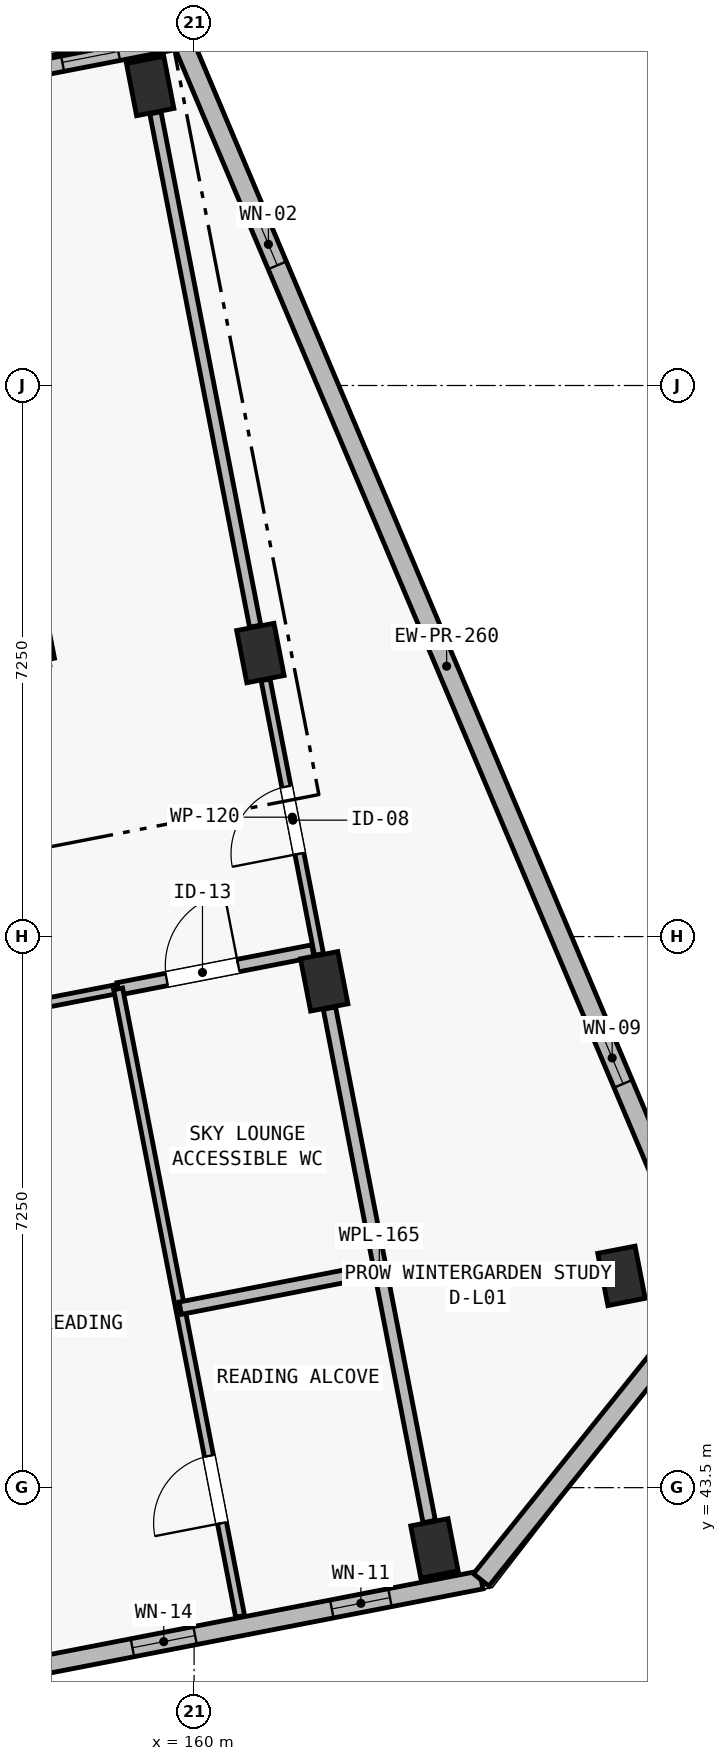
"""IFC4 building model, lengths in metres.
Left out: names, types, materials, properties, quantities, classifications, styles, units other than length and angle.
Written with IfcOpenShell. Run it as: python <this file> out.ifc"""

import sys

from ifc_helpers import new_model, si_unit, direction, frame, frame_2d, origin, origin_2d, place, context, subcontext, project, spatial, rectangle, extrude, element, fill, save


model = new_model("IFC4")
c1 = context("Model", 3, precision=1e-05, world=origin(), true_north=direction((0.0, 1.0)))
c2 = subcontext(c1, "Body", "Model", "MODEL_VIEW")
j1 = project(units=[si_unit("LENGTHUNIT", "METRE"), si_unit("PLANEANGLEUNIT", "RADIAN")], contexts=[c1])
p1 = place(None, origin())
s1 = spatial("IfcSite", under=j1, at=p1, CompositionType="ELEMENT")
p2 = place(p1, origin())
s2 = spatial("IfcBuilding", under=s1, at=p2, CompositionType="ELEMENT")
p3 = place(p2, frame((0.0, 0.0, 4.5)))
s3 = spatial("IfcBuildingStorey", under=s2, at=p3, CompositionType="ELEMENT", Elevation=4.5)
for number, where, z_axis, x_axis in (
    (1, (163.162, 42.701, 0.0), (0.0, 0.0, 1.0), (0.982, 0.191, 0.0)),
    (2, (161.712, 50.161, 0.0), (0.0, 0.0, 1.0), (0.982, 0.191, 0.0)),
    (3, (160.873, 54.48, 0.0), (0.0, 0.0, 1.0), (0.982, 0.191, 0.0)),
    (4, (159.422, 61.941, 0.0), (0.0, 0.0, 1.0), (0.982, 0.191, 0.0)),
    (5, (165.623, 46.286, 0.0), (0.0, 0.0, 1.0), (0.982, 0.191, 0.0)),
):
    element("IfcColumn", number, at=place(p3, frame(where, z_axis=z_axis, x_axis=x_axis)), inside=s3, PredefinedType="COLUMN", context=c2, shape_type="SweptSolid", body=[
        extrude(rectangle(XDim=0.5, YDim=0.7, at=origin_2d()), origin(), (0.0, 0.0, 1.0), 3.9),
    ])
p4 = place(p3, frame((163.778, 42.286, 0.0), z_axis=(0.0, 0.0, 1.0), x_axis=(-0.981628367112, -0.190802905848, 0.0)))
e6 = element("IfcWall", 6, at=p4, inside=s3, PredefinedType="SOLIDWALL", context=c2, shape_type="SweptSolid", body=[
    extrude(rectangle(XDim=8.125, YDim=0.24, at=frame_2d((4.062, 0.0))), origin(), (0.0, 0.0, 1.0), 3.65),
])
p5 = place(p4, frame((1.223, 0.0, 0.42)))
e7 = element("IfcOpeningElement", 7, at=p5, cuts=e6, PredefinedType="OPENING", context=c2, shape_type="SweptSolid", body=[
    extrude(rectangle(XDim=0.78, YDim=2.2, at=frame_2d((0.39, 1.1))), frame((0.0, 0.135, 0.0), z_axis=(0.0, -1.0, 0.0), x_axis=(1.0, 0.0, 0.0)), (0.0, 0.0, 1.0), 0.27),
])
p6 = place(p4, frame((3.835, 0.0, 0.42)))
e8 = element("IfcOpeningElement", 8, at=p6, cuts=e6, PredefinedType="OPENING", context=c2, shape_type="SweptSolid", body=[
    extrude(rectangle(XDim=0.84, YDim=2.28, at=frame_2d((0.42, 1.14))), frame((0.0, 0.135, 0.0), z_axis=(0.0, -1.0, 0.0), x_axis=(1.0, 0.0, 0.0)), (0.0, 0.0, 1.0), 0.27),
])
p7 = place(p4, frame((6.655, 0.0, 0.48)))
e9 = element("IfcOpeningElement", 9, at=p7, cuts=e6, PredefinedType="OPENING", context=c2, shape_type="SweptSolid", body=[
    extrude(rectangle(XDim=0.86, YDim=2.36, at=frame_2d((0.43, 1.18))), frame((0.0, 0.135, 0.0), z_axis=(0.0, -1.0, 0.0), x_axis=(1.0, 0.0, 0.0)), (0.0, 0.0, 1.0), 0.27),
])
p8 = place(p3, frame((151.862, 61.006, 0.0), z_axis=(0.0, 0.0, 1.0), x_axis=(0.981627273155, 0.190808533872, 0.0)))
e10 = element("IfcWall", 10, at=p8, inside=s3, PredefinedType="SOLIDWALL", context=c2, shape_type="SweptSolid", body=[
    extrude(rectangle(XDim=8.125, YDim=0.24, at=frame_2d((4.062, 0.0))), origin(), (0.0, 0.0, 1.0), 3.65),
])
p9 = place(p8, frame((6.525, 0.0, 0.45)))
e11 = element("IfcOpeningElement", 11, at=p9, cuts=e10, PredefinedType="OPENING", context=c2, shape_type="SweptSolid", body=[
    extrude(rectangle(XDim=0.75, YDim=2.32, at=frame_2d((0.375, 1.16))), frame((0.0, 0.135, 0.0), z_axis=(0.0, -1.0, 0.0), x_axis=(1.0, 0.0, 0.0)), (0.0, 0.0, 1.0), 0.27),
])
p10 = place(p3, frame((159.837, 62.556, 0.0), z_axis=(0.0, 0.0, 1.0), x_axis=(0.389225507936, -0.921142499276, 0.0)))
e12 = element("IfcWall", 12, at=p10, inside=s3, PredefinedType="SOLIDWALL", context=c2, shape_type="SweptSolid", body=[
    extrude(rectangle(XDim=17.91, YDim=0.26, at=frame_2d((8.955, 0.0))), origin(), (0.0, 0.0, 1.0), 3.65),
])
p11 = place(p10, frame((2.63, 0.0, 0.52)))
e13 = element("IfcOpeningElement", 13, at=p11, cuts=e12, PredefinedType="OPENING", context=c2, shape_type="SweptSolid", body=[
    extrude(rectangle(XDim=0.6, YDim=2.22, at=frame_2d((0.3, 1.11))), frame((0.0, 0.145, 0.0), z_axis=(0.0, -1.0, 0.0), x_axis=(1.0, 0.0, 0.0)), (0.0, 0.0, 1.0), 0.29),
])
p12 = place(p10, frame((14.18, 0.0, 0.45)))
e14 = element("IfcOpeningElement", 14, at=p12, cuts=e12, PredefinedType="OPENING", context=c2, shape_type="SweptSolid", body=[
    extrude(rectangle(XDim=0.74, YDim=2.26, at=frame_2d((0.37, 1.13))), frame((0.0, 0.145, 0.0), z_axis=(0.0, -1.0, 0.0), x_axis=(1.0, 0.0, 0.0)), (0.0, 0.0, 1.0), 0.29),
])
p13 = place(p3, frame((166.809, 46.058, 0.0), z_axis=(0.0, 0.0, 1.0), x_axis=(-0.626281072923, -0.779597343312, 0.0)))
e15 = element("IfcWall", 15, at=p13, inside=s3, PredefinedType="SOLIDWALL", context=c2, shape_type="SweptSolid", body=[
    extrude(rectangle(XDim=4.839, YDim=0.26, at=frame_2d((2.42, 0.0))), origin(), (0.0, 0.0, 1.0), 3.65),
])
p14 = place(p3, frame((158.087, 54.397, 0.0), z_axis=(0.0, 0.0, 1.0), x_axis=(-0.190796144009, 0.981629681413, 0.0)))
e16 = element("IfcWall", 16, at=p14, inside=s3, PredefinedType="PARTITIONING", context=c2, shape_type="SweptSolid", body=[
    extrude(rectangle(XDim=4.0, YDim=0.155, at=frame_2d((2.0, 0.0))), origin(), (0.0, 0.0, 1.0), 3.62),
])
p15 = place(p14, frame((1.4, 0.0, 0.0)))
e17 = element("IfcOpeningElement", 17, at=p15, cuts=e16, PredefinedType="OPENING", context=c2, shape_type="SweptSolid", body=[
    extrude(rectangle(XDim=1.18, YDim=2.15, at=frame_2d((0.59, 1.075))), frame((0.0, 0.093, 0.0), z_axis=(0.0, -1.0, 0.0), x_axis=(1.0, 0.0, 0.0)), (0.0, 0.0, 1.0), 0.185),
])
p16 = place(p3, frame((161.643, 50.515, 0.0), z_axis=(0.0, 0.0, 1.0), x_axis=(-0.190805731561, 0.981627817864, 0.0)))
e18 = element("IfcWall", 18, at=p16, inside=s3, PredefinedType="PARTITIONING", context=c2, shape_type="SweptSolid", body=[
    extrude(rectangle(XDim=3.68, YDim=0.12, at=frame_2d((1.84, 0.0))), origin(), (0.0, 0.0, 1.0), 3.15),
])
p17 = place(p16, frame((1.35, 0.0, 0.0)))
e19 = element("IfcOpeningElement", 19, at=p17, cuts=e18, PredefinedType="OPENING", context=c2, shape_type="SweptSolid", body=[
    extrude(rectangle(XDim=0.9, YDim=2.1, at=frame_2d((0.45, 1.05))), frame((0.0, 0.075, 0.0), z_axis=(0.0, -1.0, 0.0), x_axis=(1.0, 0.0, 0.0)), (0.0, 0.0, 1.0), 0.15),
])
p18 = place(p3, frame((160.804, 54.834, 0.0), z_axis=(0.0, 0.0, 1.0), x_axis=(-0.190804123115, 0.981628130507, 0.0)))
e20 = element("IfcWall", 20, at=p18, inside=s3, PredefinedType="PARTITIONING", context=c2, shape_type="SweptSolid", body=[
    extrude(rectangle(XDim=6.88, YDim=0.15, at=frame_2d((3.44, 0.0))), origin(), (0.0, 0.0, 1.0), 3.15),
])
p19 = place(p3, frame((163.094, 43.054, 0.0), z_axis=(0.0, 0.0, 1.0), x_axis=(-0.190804123115, 0.981628130507, 0.0)))
e21 = element("IfcWall", 21, at=p19, inside=s3, PredefinedType="PLUMBINGWALL", context=c2, shape_type="SweptSolid", body=[
    extrude(rectangle(XDim=6.88, YDim=0.165, at=frame_2d((3.44, 0.0))), origin(), (0.0, 0.0, 1.0), 3.15),
])
p20 = place(p3, frame((154.427, 49.173, 0.0), z_axis=(0.0, 0.0, 1.0), x_axis=(0.981628202514, 0.190803752658, 0.0)))
e22 = element("IfcWall", 22, at=p20, inside=s3, PredefinedType="PARTITIONING", context=c2, shape_type="SweptSolid", body=[
    extrude(rectangle(XDim=4.66, YDim=0.12, at=frame_2d((2.33, 0.0))), origin(), (0.0, 0.0, 1.0), 3.62),
])
p21 = place(p20, frame((1.15, 0.0, 0.0)))
e23 = element("IfcOpeningElement", 23, at=p21, cuts=e22, PredefinedType="OPENING", context=c2, shape_type="SweptSolid", body=[
    extrude(rectangle(XDim=1.15, YDim=2.15, at=frame_2d((0.575, 1.075))), frame((0.0, 0.075, 0.0), z_axis=(0.0, -1.0, 0.0), x_axis=(1.0, 0.0, 0.0)), (0.0, 0.0, 1.0), 0.15),
])
p22 = place(p3, frame((159.001, 50.062, 0.0), z_axis=(0.0, 0.0, 1.0), x_axis=(0.981624151626, 0.190824592083, 0.0)))
e24 = element("IfcWall", 24, at=p22, inside=s3, PredefinedType="PLUMBINGWALL", context=c2, shape_type="SweptSolid", body=[
    extrude(rectangle(XDim=2.61, YDim=0.165, at=frame_2d((1.305, 0.0))), origin(), (0.0, 0.0, 1.0), 3.62),
])
p23 = place(p22, frame((0.65, 0.0, 0.0)))
e25 = element("IfcOpeningElement", 25, at=p23, cuts=e24, PredefinedType="OPENING", context=c2, shape_type="SweptSolid", body=[
    extrude(rectangle(XDim=0.96, YDim=2.12, at=frame_2d((0.48, 1.06))), frame((0.0, 0.097, 0.0), z_axis=(0.0, -1.0, 0.0), x_axis=(1.0, 0.0, 0.0)), (0.0, 0.0, 1.0), 0.195),
])
p24 = place(p3, frame((160.606, 41.807, 0.0), z_axis=(0.0, 0.0, 1.0), x_axis=(-0.190809830256, 0.981627021163, 0.0)))
e26 = element("IfcWall", 26, at=p24, inside=s3, PredefinedType="PARTITIONING", context=c2, shape_type="SweptSolid", body=[
    extrude(rectangle(XDim=8.41, YDim=0.12, at=frame_2d((4.205, 0.0))), origin(), (0.0, 0.0, 1.0), 3.62),
])
p25 = place(p24, frame((1.25, 0.0, 0.0)))
e27 = element("IfcOpeningElement", 27, at=p25, cuts=e26, PredefinedType="OPENING", context=c2, shape_type="SweptSolid", body=[
    extrude(rectangle(XDim=0.9, YDim=2.1, at=frame_2d((0.45, 1.05))), frame((0.0, 0.075, 0.0), z_axis=(0.0, -1.0, 0.0), x_axis=(1.0, 0.0, 0.0)), (0.0, 0.0, 1.0), 0.15),
])
p26 = place(p3, frame((159.818, 45.861, 0.0), z_axis=(0.0, 0.0, 1.0), x_axis=(0.981628634101, 0.19080153226, 0.0)))
e28 = element("IfcWall", 28, at=p26, inside=s3, PredefinedType="PLUMBINGWALL", context=c2, shape_type="SweptSolid", body=[
    extrude(rectangle(XDim=2.59, YDim=0.165, at=frame_2d((1.295, 0.0))), origin(), (0.0, 0.0, 1.0), 3.62),
])
p27 = place(p5, origin())
e29 = element("IfcWindow", 29, at=p27, inside=s3, PartitioningType="SINGLE_PANEL", PredefinedType="WINDOW", context=c2, shape_type="SweptSolid", body=[
    extrude(rectangle(XDim=0.78, YDim=2.2, at=frame_2d((0.39, 1.1))), frame((0.0, 0.03, 0.0), z_axis=(0.0, -1.0, 0.0), x_axis=(1.0, 0.0, 0.0)), (0.0, 0.0, 1.0), 0.06),
])
fill(e7, e29)
p28 = place(p6, origin())
e30 = element("IfcWindow", 30, at=p28, inside=s3, PartitioningType="SINGLE_PANEL", PredefinedType="WINDOW", context=c2, shape_type="SweptSolid", body=[
    extrude(rectangle(XDim=0.84, YDim=2.28, at=frame_2d((0.42, 1.14))), frame((0.0, 0.03, 0.0), z_axis=(0.0, -1.0, 0.0), x_axis=(1.0, 0.0, 0.0)), (0.0, 0.0, 1.0), 0.06),
])
fill(e8, e30)
p29 = place(p9, origin())
e31 = element("IfcWindow", 31, at=p29, inside=s3, PartitioningType="SINGLE_PANEL", PredefinedType="WINDOW", context=c2, shape_type="SweptSolid", body=[
    extrude(rectangle(XDim=0.75, YDim=2.32, at=frame_2d((0.375, 1.16))), frame((0.0, 0.03, 0.0), z_axis=(0.0, -1.0, 0.0), x_axis=(1.0, 0.0, 0.0)), (0.0, 0.0, 1.0), 0.06),
])
fill(e11, e31)
p30 = place(p11, origin())
e32 = element("IfcWindow", 32, at=p30, inside=s3, PartitioningType="SINGLE_PANEL", PredefinedType="WINDOW", context=c2, shape_type="SweptSolid", body=[
    extrude(rectangle(XDim=0.6, YDim=2.22, at=frame_2d((0.3, 1.11))), frame((0.0, 0.03, 0.0), z_axis=(0.0, -1.0, 0.0), x_axis=(1.0, 0.0, 0.0)), (0.0, 0.0, 1.0), 0.06),
])
fill(e13, e32)
p31 = place(p12, origin())
e33 = element("IfcWindow", 33, at=p31, inside=s3, PartitioningType="SINGLE_PANEL", PredefinedType="WINDOW", context=c2, shape_type="SweptSolid", body=[
    extrude(rectangle(XDim=0.74, YDim=2.26, at=frame_2d((0.37, 1.13))), frame((0.0, 0.03, 0.0), z_axis=(0.0, -1.0, 0.0), x_axis=(1.0, 0.0, 0.0)), (0.0, 0.0, 1.0), 0.06),
])
fill(e14, e33)
p32 = place(p17, origin())
e34 = element("IfcDoor", 34, at=p32, inside=s3, OperationType="SINGLE_SWING_LEFT", PredefinedType="DOOR", context=c2, shape_type="SweptSolid", body=[
    extrude(rectangle(XDim=0.9, YDim=2.1, at=frame_2d((0.45, 1.05))), frame((0.0, 0.025, 0.0), z_axis=(0.0, -1.0, 0.0), x_axis=(1.0, 0.0, 0.0)), (0.0, 0.0, 1.0), 0.05),
])
fill(e19, e34)
p33 = place(p23, origin())
e35 = element("IfcDoor", 35, at=p33, inside=s3, OperationType="SINGLE_SWING_RIGHT", PredefinedType="DOOR", context=c2, shape_type="SweptSolid", body=[
    extrude(rectangle(XDim=0.96, YDim=2.12, at=frame_2d((0.48, 1.06))), frame((0.0, 0.025, 0.0), z_axis=(0.0, -1.0, 0.0), x_axis=(1.0, 0.0, 0.0)), (0.0, 0.0, 1.0), 0.05),
])
fill(e25, e35)
p34 = place(p25, origin())
e36 = element("IfcDoor", 36, at=p34, inside=s3, OperationType="SINGLE_SWING_LEFT", PredefinedType="DOOR", context=c2, shape_type="SweptSolid", body=[
    extrude(rectangle(XDim=0.9, YDim=2.1, at=frame_2d((0.45, 1.05))), frame((0.0, 0.025, 0.0), z_axis=(0.0, -1.0, 0.0), x_axis=(1.0, 0.0, 0.0)), (0.0, 0.0, 1.0), 0.05),
])
fill(e27, e36)
save(model, sys.argv[1])
